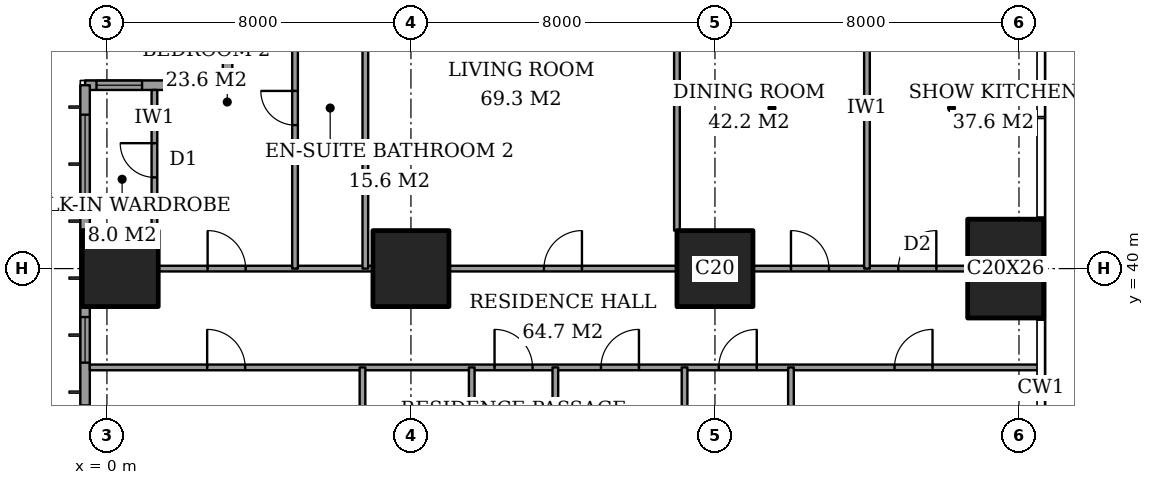
"""IFC4 building model, lengths in metres.
Left out: names, types, materials, properties, quantities, classifications, styles, units other than length and angle.
Written with IfcOpenShell. Run it as: python <this file> out.ifc"""

import sys

from ifc_helpers import new_model, si_unit, direction, frame, frame_2d, origin, origin_2d, place, context, subcontext, project, spatial, rectangle, extrude, element, fill, save


model = new_model("IFC4")
c1 = context("Model", 3, precision=1e-05, world=origin(), true_north=direction((0.0, 1.0)))
c2 = subcontext(c1, "Body", "Model", "MODEL_VIEW")
j1 = project(units=[si_unit("LENGTHUNIT", "METRE"), si_unit("PLANEANGLEUNIT", "RADIAN")], contexts=[c1])
p1 = place(None, origin())
s1 = spatial("IfcSite", under=j1, at=p1, CompositionType="ELEMENT")
p2 = place(p1, origin())
s2 = spatial("IfcBuilding", under=s1, at=p2, CompositionType="ELEMENT")
p3 = place(p2, frame((0.0, 0.0, 62.0)))
s3 = spatial("IfcBuildingStorey", under=s2, at=p3, CompositionType="ELEMENT", Elevation=62.0)
for number, where, z_axis, x_axis in (
    (1, (0.35, 40.0, 0.0), (0.0, 0.0, 1.0), (1.0, 0.0, 0.0)),
    (2, (8.0, 40.0, 0.0), (0.0, 0.0, 1.0), (1.0, 0.0, 0.0)),
    (3, (16.0, 40.0, 0.0), (0.0, 0.0, 1.0), (1.0, 0.0, 0.0)),
):
    element("IfcColumn", number, at=place(p3, frame(where, z_axis=z_axis, x_axis=x_axis)), inside=s3, PredefinedType="COLUMN", context=c2, shape_type="SweptSolid", body=[
        extrude(rectangle(XDim=2.0, YDim=2.0, at=origin_2d()), origin(), (0.0, 0.0, 1.0), 3.6),
    ])
p4 = place(p3, frame((23.65, 40.0, 0.0), z_axis=(0.0, 0.0, 1.0), x_axis=(1.0, 0.0, 0.0)))
e4 = element("IfcColumn", 4, at=p4, inside=s3, PredefinedType="COLUMN", context=c2, shape_type="SweptSolid", body=[
    extrude(rectangle(XDim=2.0, YDim=2.6, at=origin_2d()), origin(), (0.0, 0.0, 1.0), 3.6),
])
p5 = place(p3, frame((3.175, 48.575, 0.0), z_axis=(0.0, 0.0, 1.0), x_axis=(0.0, -1.0, 0.0)))
e5 = element("IfcWall", 5, at=p5, inside=s3, PredefinedType="SOLIDWALL", context=c2, shape_type="SweptSolid", body=[
    extrude(rectangle(XDim=3.75, YDim=0.25, at=frame_2d((1.875, 0.0))), origin(), (0.0, 0.0, 1.0), 3.6),
])
p6 = place(p5, frame((0.738, 0.0, 0.6)))
e6 = element("IfcOpeningElement", 6, at=p6, cuts=e5, PredefinedType="OPENING", context=c2, shape_type="SweptSolid", body=[
    extrude(rectangle(XDim=2.4, YDim=2.0, at=frame_2d((1.2, 1.0))), frame((0.0, 0.135, 0.0), z_axis=(0.0, -1.0, 0.0), x_axis=(1.0, 0.0, 0.0)), (0.0, 0.0, 1.0), 0.27),
])
p7 = place(p3, frame((3.175, 44.825, 0.0), z_axis=(0.0, 0.0, 1.0), x_axis=(-1.0, 0.0, 0.0)))
e7 = element("IfcWall", 7, at=p7, inside=s3, PredefinedType="SOLIDWALL", context=c2, shape_type="SweptSolid", body=[
    extrude(rectangle(XDim=3.75, YDim=0.25, at=frame_2d((1.875, 0.0))), origin(), (0.0, 0.0, 1.0), 3.6),
])
p8 = place(p7, frame((0.363, 0.0, 0.6)))
e8 = element("IfcOpeningElement", 8, at=p8, cuts=e7, PredefinedType="OPENING", context=c2, shape_type="SweptSolid", body=[
    extrude(rectangle(XDim=1.2, YDim=2.0, at=frame_2d((0.6, 1.0))), frame((0.0, 0.135, 0.0), z_axis=(0.0, -1.0, 0.0), x_axis=(1.0, 0.0, 0.0)), (0.0, 0.0, 1.0), 0.27),
])
p9 = place(p7, frame((2.25, 0.0, 0.6)))
e9 = element("IfcOpeningElement", 9, at=p9, cuts=e7, PredefinedType="OPENING", context=c2, shape_type="SweptSolid", body=[
    extrude(rectangle(XDim=1.2, YDim=2.0, at=frame_2d((0.6, 1.0))), frame((0.0, 0.135, 0.0), z_axis=(0.0, -1.0, 0.0), x_axis=(1.0, 0.0, 0.0)), (0.0, 0.0, 1.0), 0.27),
])
p10 = place(p3, frame((-0.575, 44.825, 0.0), z_axis=(0.0, 0.0, 1.0), x_axis=(0.0, -1.0, 0.0)))
e10 = element("IfcWall", 10, at=p10, inside=s3, PredefinedType="SOLIDWALL", context=c2, shape_type="SweptSolid", body=[
    extrude(rectangle(XDim=41.65, YDim=0.25, at=frame_2d((20.825, 0.0))), origin(), (0.0, 0.0, 1.0), 3.6),
])
p11 = place(p10, frame((0.775, 0.0, 0.6)))
e11 = element("IfcOpeningElement", 11, at=p11, cuts=e10, PredefinedType="OPENING", context=c2, shape_type="SweptSolid", body=[
    extrude(rectangle(XDim=2.4, YDim=2.0, at=frame_2d((1.2, 1.0))), frame((0.0, 0.135, 0.0), z_axis=(0.0, -1.0, 0.0), x_axis=(1.0, 0.0, 0.0)), (0.0, 0.0, 1.0), 0.27),
])
p12 = place(p10, frame((6.1, 0.0, 0.6)))
e12 = element("IfcOpeningElement", 12, at=p12, cuts=e10, PredefinedType="OPENING", context=c2, shape_type="SweptSolid", body=[
    extrude(rectangle(XDim=1.2, YDim=2.0, at=frame_2d((0.6, 1.0))), frame((0.0, 0.135, 0.0), z_axis=(0.0, -1.0, 0.0), x_axis=(1.0, 0.0, 0.0)), (0.0, 0.0, 1.0), 0.27),
])
p13 = place(p10, frame((8.425, 0.0, 0.6)))
e13 = element("IfcOpeningElement", 13, at=p13, cuts=e10, PredefinedType="OPENING", context=c2, shape_type="SweptSolid", body=[
    extrude(rectangle(XDim=2.4, YDim=2.0, at=frame_2d((1.2, 1.0))), frame((0.0, 0.135, 0.0), z_axis=(0.0, -1.0, 0.0), x_axis=(1.0, 0.0, 0.0)), (0.0, 0.0, 1.0), 0.27),
])
p14 = place(p10, frame((15.625, 0.0, 0.6)))
e14 = element("IfcOpeningElement", 14, at=p14, cuts=e10, PredefinedType="OPENING", context=c2, shape_type="SweptSolid", body=[
    extrude(rectangle(XDim=2.4, YDim=2.0, at=frame_2d((1.2, 1.0))), frame((0.0, 0.135, 0.0), z_axis=(0.0, -1.0, 0.0), x_axis=(1.0, 0.0, 0.0)), (0.0, 0.0, 1.0), 0.27),
])
p15 = place(p10, frame((23.625, 0.0, 0.6)))
e15 = element("IfcOpeningElement", 15, at=p15, cuts=e10, PredefinedType="OPENING", context=c2, shape_type="SweptSolid", body=[
    extrude(rectangle(XDim=2.4, YDim=2.0, at=frame_2d((1.2, 1.0))), frame((0.0, 0.135, 0.0), z_axis=(0.0, -1.0, 0.0), x_axis=(1.0, 0.0, 0.0)), (0.0, 0.0, 1.0), 0.27),
])
p16 = place(p10, frame((30.825, 0.0, 0.6)))
e16 = element("IfcOpeningElement", 16, at=p16, cuts=e10, PredefinedType="OPENING", context=c2, shape_type="SweptSolid", body=[
    extrude(rectangle(XDim=2.4, YDim=2.0, at=frame_2d((1.2, 1.0))), frame((0.0, 0.135, 0.0), z_axis=(0.0, -1.0, 0.0), x_axis=(1.0, 0.0, 0.0)), (0.0, 0.0, 1.0), 0.27),
])
p17 = place(p10, frame((34.5, 0.0, 0.6)))
e17 = element("IfcOpeningElement", 17, at=p17, cuts=e10, PredefinedType="OPENING", context=c2, shape_type="SweptSolid", body=[
    extrude(rectangle(XDim=1.2, YDim=2.0, at=frame_2d((0.6, 1.0))), frame((0.0, 0.135, 0.0), z_axis=(0.0, -1.0, 0.0), x_axis=(1.0, 0.0, 0.0)), (0.0, 0.0, 1.0), 0.27),
])
p18 = place(p10, frame((38.475, 0.0, 0.6)))
e18 = element("IfcOpeningElement", 18, at=p18, cuts=e10, PredefinedType="OPENING", context=c2, shape_type="SweptSolid", body=[
    extrude(rectangle(XDim=2.4, YDim=2.0, at=frame_2d((1.2, 1.0))), frame((0.0, 0.135, 0.0), z_axis=(0.0, -1.0, 0.0), x_axis=(1.0, 0.0, 0.0)), (0.0, 0.0, 1.0), 0.27),
])
p19 = place(p3, frame((-0.45, 37.4, 0.0), z_axis=(0.0, 0.0, 1.0), x_axis=(1.0, 0.0, 0.0)))
e19 = element("IfcWall", 19, at=p19, inside=s3, PredefinedType="PARTITIONING", context=c2, shape_type="SweptSolid", body=[
    extrude(rectangle(XDim=25.011, YDim=0.15, at=frame_2d((12.505, 0.0))), origin(), (0.0, 0.0, 1.0), 3.35),
])
p20 = place(p19, frame((10.65, 0.0, 0.0)))
e20 = element("IfcOpeningElement", 20, at=p20, cuts=e19, PredefinedType="OPENING", context=c2, shape_type="SweptSolid", body=[
    extrude(rectangle(XDim=1.0, YDim=2.1, at=frame_2d((0.5, 1.05))), frame((0.0, 0.085, 0.0), z_axis=(0.0, -1.0, 0.0), x_axis=(1.0, 0.0, 0.0)), (0.0, 0.0, 1.0), 0.17),
])
p21 = place(p19, frame((3.087, 0.0, 0.0)))
e21 = element("IfcOpeningElement", 21, at=p21, cuts=e19, PredefinedType="OPENING", context=c2, shape_type="SweptSolid", body=[
    extrude(rectangle(XDim=1.0, YDim=2.1, at=frame_2d((0.5, 1.05))), frame((0.0, 0.085, 0.0), z_axis=(0.0, -1.0, 0.0), x_axis=(1.0, 0.0, 0.0)), (0.0, 0.0, 1.0), 0.17),
])
p22 = place(p19, frame((13.45, 0.0, 0.0)))
e22 = element("IfcOpeningElement", 22, at=p22, cuts=e19, PredefinedType="OPENING", context=c2, shape_type="SweptSolid", body=[
    extrude(rectangle(XDim=1.0, YDim=2.1, at=frame_2d((0.5, 1.05))), frame((0.0, 0.085, 0.0), z_axis=(0.0, -1.0, 0.0), x_axis=(1.0, 0.0, 0.0)), (0.0, 0.0, 1.0), 0.17),
])
p23 = place(p19, frame((16.55, 0.0, 0.0)))
e23 = element("IfcOpeningElement", 23, at=p23, cuts=e19, PredefinedType="OPENING", context=c2, shape_type="SweptSolid", body=[
    extrude(rectangle(XDim=1.0, YDim=2.1, at=frame_2d((0.5, 1.05))), frame((0.0, 0.085, 0.0), z_axis=(0.0, -1.0, 0.0), x_axis=(1.0, 0.0, 0.0)), (0.0, 0.0, 1.0), 0.17),
])
p24 = place(p19, frame((21.175, 0.0, 0.0)))
e24 = element("IfcOpeningElement", 24, at=p24, cuts=e19, PredefinedType="OPENING", context=c2, shape_type="SweptSolid", body=[
    extrude(rectangle(XDim=1.0, YDim=2.1, at=frame_2d((0.5, 1.05))), frame((0.0, 0.085, 0.0), z_axis=(0.0, -1.0, 0.0), x_axis=(1.0, 0.0, 0.0)), (0.0, 0.0, 1.0), 0.17),
])
p25 = place(p3, frame((1.35, 40.0, 0.0), z_axis=(0.0, 0.0, 1.0), x_axis=(1.0, 0.0, 0.0)))
e25 = element("IfcWall", 25, at=p25, inside=s3, PredefinedType="PARTITIONING", context=c2, shape_type="SweptSolid", body=[
    extrude(rectangle(XDim=5.65, YDim=0.15, at=frame_2d((2.825, 0.0))), origin(), (0.0, 0.0, 1.0), 3.35),
])
p26 = place(p25, frame((1.3, 0.0, 0.0)))
e26 = element("IfcOpeningElement", 26, at=p26, cuts=e25, PredefinedType="OPENING", context=c2, shape_type="SweptSolid", body=[
    extrude(rectangle(XDim=1.0, YDim=2.1, at=frame_2d((0.5, 1.05))), frame((0.0, 0.085, 0.0), z_axis=(0.0, -1.0, 0.0), x_axis=(1.0, 0.0, 0.0)), (0.0, 0.0, 1.0), 0.17),
])
p27 = place(p3, frame((9.0, 40.0, 0.0), z_axis=(0.0, 0.0, 1.0), x_axis=(1.0, 0.0, 0.0)))
e27 = element("IfcWall", 27, at=p27, inside=s3, PredefinedType="PARTITIONING", context=c2, shape_type="SweptSolid", body=[
    extrude(rectangle(XDim=6.0, YDim=0.15, at=frame_2d((3.0, 0.0))), origin(), (0.0, 0.0, 1.0), 3.35),
])
p28 = place(p27, frame((2.5, 0.0, 0.0)))
e28 = element("IfcOpeningElement", 28, at=p28, cuts=e27, PredefinedType="OPENING", context=c2, shape_type="SweptSolid", body=[
    extrude(rectangle(XDim=1.0, YDim=2.1, at=frame_2d((0.5, 1.05))), frame((0.0, 0.085, 0.0), z_axis=(0.0, -1.0, 0.0), x_axis=(1.0, 0.0, 0.0)), (0.0, 0.0, 1.0), 0.17),
])
p29 = place(p3, frame((17.0, 40.0, 0.0), z_axis=(0.0, 0.0, 1.0), x_axis=(1.0, 0.0, 0.0)))
e29 = element("IfcWall", 29, at=p29, inside=s3, PredefinedType="PARTITIONING", context=c2, shape_type="SweptSolid", body=[
    extrude(rectangle(XDim=5.65, YDim=0.15, at=frame_2d((2.825, 0.0))), origin(), (0.0, 0.0, 1.0), 3.35),
])
p30 = place(p29, frame((1.0, 0.0, 0.0)))
e30 = element("IfcOpeningElement", 30, at=p30, cuts=e29, PredefinedType="OPENING", context=c2, shape_type="SweptSolid", body=[
    extrude(rectangle(XDim=1.0, YDim=2.1, at=frame_2d((0.5, 1.05))), frame((0.0, 0.085, 0.0), z_axis=(0.0, -1.0, 0.0), x_axis=(1.0, 0.0, 0.0)), (0.0, 0.0, 1.0), 0.17),
])
p31 = place(p29, frame((3.825, 0.0, 0.0)))
e31 = element("IfcOpeningElement", 31, at=p31, cuts=e29, PredefinedType="OPENING", context=c2, shape_type="SweptSolid", body=[
    extrude(rectangle(XDim=1.0, YDim=2.1, at=frame_2d((0.5, 1.05))), frame((0.0, 0.085, 0.0), z_axis=(0.0, -1.0, 0.0), x_axis=(1.0, 0.0, 0.0)), (0.0, 0.0, 1.0), 0.17),
])
p32 = place(p3, frame((1.25, 41.0, 0.0), z_axis=(0.0, 0.0, 1.0), x_axis=(0.0, 1.0, 0.0)))
e32 = element("IfcWall", 32, at=p32, inside=s3, PredefinedType="PARTITIONING", context=c2, shape_type="SweptSolid", body=[
    extrude(rectangle(XDim=3.7, YDim=0.15, at=frame_2d((1.85, 0.0))), origin(), (0.0, 0.0, 1.0), 3.35),
])
p33 = place(p32, frame((1.4, 0.0, 0.0)))
e33 = element("IfcOpeningElement", 33, at=p33, cuts=e32, PredefinedType="OPENING", context=c2, shape_type="SweptSolid", body=[
    extrude(rectangle(XDim=0.9, YDim=2.1, at=frame_2d((0.45, 1.05))), frame((0.0, 0.085, 0.0), z_axis=(0.0, -1.0, 0.0), x_axis=(1.0, 0.0, 0.0)), (0.0, 0.0, 1.0), 0.17),
])
p34 = place(p3, frame((4.95, 40.0, 0.0), z_axis=(0.0, 0.0, 1.0), x_axis=(0.0, 1.0, 0.0)))
e34 = element("IfcWall", 34, at=p34, inside=s3, PredefinedType="PARTITIONING", context=c2, shape_type="SweptSolid", body=[
    extrude(rectangle(XDim=8.45, YDim=0.15, at=frame_2d((4.225, 0.0))), origin(), (0.0, 0.0, 1.0), 3.35),
])
p35 = place(p34, frame((3.775, 0.0, 0.0)))
e35 = element("IfcOpeningElement", 35, at=p35, cuts=e34, PredefinedType="OPENING", context=c2, shape_type="SweptSolid", body=[
    extrude(rectangle(XDim=0.9, YDim=2.1, at=frame_2d((0.45, 1.05))), frame((0.0, 0.085, 0.0), z_axis=(0.0, -1.0, 0.0), x_axis=(1.0, 0.0, 0.0)), (0.0, 0.0, 1.0), 0.17),
])
p36 = place(p3, frame((6.725, 33.2, 0.0), z_axis=(0.0, 0.0, 1.0), x_axis=(0.0, 1.0, 0.0)))
e36 = element("IfcWall", 36, at=p36, inside=s3, PredefinedType="PARTITIONING", context=c2, shape_type="SweptSolid", body=[
    extrude(rectangle(XDim=4.2, YDim=0.15, at=frame_2d((2.1, 0.0))), origin(), (0.0, 0.0, 1.0), 3.35),
])
p37 = place(p36, frame((2.1, 0.0, 0.0)))
e37 = element("IfcOpeningElement", 37, at=p37, cuts=e36, PredefinedType="OPENING", context=c2, shape_type="SweptSolid", body=[
    extrude(rectangle(XDim=0.9, YDim=2.1, at=frame_2d((0.45, 1.05))), frame((0.0, 0.085, 0.0), z_axis=(0.0, -1.0, 0.0), x_axis=(1.0, 0.0, 0.0)), (0.0, 0.0, 1.0), 0.17),
])
p38 = place(p3, frame((6.8, 40.0, 0.0), z_axis=(0.0, 0.0, 1.0), x_axis=(0.0, 1.0, 0.0)))
e38 = element("IfcWall", 38, at=p38, inside=s3, PredefinedType="PARTITIONING", context=c2, shape_type="SweptSolid", body=[
    extrude(rectangle(XDim=8.45, YDim=0.15, at=frame_2d((4.225, 0.0))), origin(), (0.0, 0.0, 1.0), 3.35),
])
p39 = place(p3, frame((9.6, 28.0, 0.0), z_axis=(0.0, 0.0, 1.0), x_axis=(0.0, 1.0, 0.0)))
e39 = element("IfcWall", 39, at=p39, inside=s3, PredefinedType="PARTITIONING", context=c2, shape_type="SweptSolid", body=[
    extrude(rectangle(XDim=9.4, YDim=0.15, at=frame_2d((4.7, 0.0))), origin(), (0.0, 0.0, 1.0), 3.35),
])
p40 = place(p39, frame((0.5, 0.0, 0.0)))
e40 = element("IfcOpeningElement", 40, at=p40, cuts=e39, PredefinedType="OPENING", context=c2, shape_type="SweptSolid", body=[
    extrude(rectangle(XDim=1.0, YDim=2.1, at=frame_2d((0.5, 1.05))), frame((0.0, 0.085, 0.0), z_axis=(0.0, -1.0, 0.0), x_axis=(1.0, 0.0, 0.0)), (0.0, 0.0, 1.0), 0.17),
])
p41 = place(p3, frame((11.8, 30.0, 0.0), z_axis=(0.0, 0.0, 1.0), x_axis=(0.0, 1.0, 0.0)))
e41 = element("IfcWall", 41, at=p41, inside=s3, PredefinedType="PARTITIONING", context=c2, shape_type="SweptSolid", body=[
    extrude(rectangle(XDim=7.4, YDim=0.15, at=frame_2d((3.7, 0.0))), origin(), (0.0, 0.0, 1.0), 3.35),
])
p42 = place(p3, frame((15.0, 41.0, 0.0), z_axis=(0.0, 0.0, 1.0), x_axis=(0.0, 1.0, 0.0)))
e42 = element("IfcWall", 42, at=p42, inside=s3, PredefinedType="PARTITIONING", context=c2, shape_type="SweptSolid", body=[
    extrude(rectangle(XDim=5.65, YDim=0.15, at=frame_2d((2.825, 0.0))), origin(), (0.0, 0.0, 1.0), 3.35),
])
p43 = place(p3, frame((15.2, 33.2, 0.0), z_axis=(0.0, 0.0, 1.0), x_axis=(0.0, 1.0, 0.0)))
e43 = element("IfcWall", 43, at=p43, inside=s3, PredefinedType="PARTITIONING", context=c2, shape_type="SweptSolid", body=[
    extrude(rectangle(XDim=4.2, YDim=0.15, at=frame_2d((2.1, 0.0))), origin(), (0.0, 0.0, 1.0), 3.35),
])
p44 = place(p3, frame((18.0, 31.4, 0.0), z_axis=(0.0, 0.0, 1.0), x_axis=(0.0, 1.0, 0.0)))
e44 = element("IfcWall", 44, at=p44, inside=s3, PredefinedType="PARTITIONING", context=c2, shape_type="SweptSolid", body=[
    extrude(rectangle(XDim=6.0, YDim=0.15, at=frame_2d((3.0, 0.0))), origin(), (0.0, 0.0, 1.0), 3.35),
])
p45 = place(p3, frame((20.0, 40.0, 0.0), z_axis=(0.0, 0.0, 1.0), x_axis=(0.0, 1.0, 0.0)))
e45 = element("IfcWall", 45, at=p45, inside=s3, PredefinedType="PARTITIONING", context=c2, shape_type="SweptSolid", body=[
    extrude(rectangle(XDim=8.45, YDim=0.15, at=frame_2d((4.225, 0.0))), origin(), (0.0, 0.0, 1.0), 3.35),
])
p46 = place(p6, origin())
e46 = element("IfcWindow", 46, at=p46, inside=s3, PartitioningType="SINGLE_PANEL", PredefinedType="WINDOW", context=c2, shape_type="SweptSolid", body=[
    extrude(rectangle(XDim=2.4, YDim=2.0, at=frame_2d((1.2, 1.0))), frame((0.0, 0.03, 0.0), z_axis=(0.0, -1.0, 0.0), x_axis=(1.0, 0.0, 0.0)), (0.0, 0.0, 1.0), 0.06),
])
fill(e6, e46)
p47 = place(p8, origin())
e47 = element("IfcWindow", 47, at=p47, inside=s3, PartitioningType="SINGLE_PANEL", PredefinedType="WINDOW", context=c2, shape_type="SweptSolid", body=[
    extrude(rectangle(XDim=1.2, YDim=2.0, at=frame_2d((0.6, 1.0))), frame((0.0, 0.03, 0.0), z_axis=(0.0, -1.0, 0.0), x_axis=(1.0, 0.0, 0.0)), (0.0, 0.0, 1.0), 0.06),
])
fill(e8, e47)
p48 = place(p9, origin())
e48 = element("IfcWindow", 48, at=p48, inside=s3, PartitioningType="SINGLE_PANEL", PredefinedType="WINDOW", context=c2, shape_type="SweptSolid", body=[
    extrude(rectangle(XDim=1.2, YDim=2.0, at=frame_2d((0.6, 1.0))), frame((0.0, 0.03, 0.0), z_axis=(0.0, -1.0, 0.0), x_axis=(1.0, 0.0, 0.0)), (0.0, 0.0, 1.0), 0.06),
])
fill(e9, e48)
p49 = place(p11, origin())
e49 = element("IfcWindow", 49, at=p49, inside=s3, PartitioningType="SINGLE_PANEL", PredefinedType="WINDOW", context=c2, shape_type="SweptSolid", body=[
    extrude(rectangle(XDim=2.4, YDim=2.0, at=frame_2d((1.2, 1.0))), frame((0.0, 0.03, 0.0), z_axis=(0.0, -1.0, 0.0), x_axis=(1.0, 0.0, 0.0)), (0.0, 0.0, 1.0), 0.06),
])
fill(e11, e49)
p50 = place(p12, origin())
e50 = element("IfcWindow", 50, at=p50, inside=s3, PartitioningType="SINGLE_PANEL", PredefinedType="WINDOW", context=c2, shape_type="SweptSolid", body=[
    extrude(rectangle(XDim=1.2, YDim=2.0, at=frame_2d((0.6, 1.0))), frame((0.0, 0.03, 0.0), z_axis=(0.0, -1.0, 0.0), x_axis=(1.0, 0.0, 0.0)), (0.0, 0.0, 1.0), 0.06),
])
fill(e12, e50)
p51 = place(p33, origin())
e51 = element("IfcDoor", 51, at=p51, inside=s3, OperationType="SINGLE_SWING_LEFT", PredefinedType="DOOR", context=c2, shape_type="SweptSolid", body=[
    extrude(rectangle(XDim=0.9, YDim=2.1, at=frame_2d((0.45, 1.05))), frame((0.0, 0.025, 0.0), z_axis=(0.0, -1.0, 0.0), x_axis=(1.0, 0.0, 0.0)), (0.0, 0.0, 1.0), 0.05),
])
fill(e33, e51)
p52 = place(p26, origin())
e52 = element("IfcDoor", 52, at=p52, inside=s3, OperationType="SINGLE_SWING_RIGHT", PredefinedType="DOOR", context=c2, shape_type="SweptSolid", body=[
    extrude(rectangle(XDim=1.0, YDim=2.1, at=frame_2d((0.5, 1.05))), frame((0.0, 0.025, 0.0), z_axis=(0.0, -1.0, 0.0), x_axis=(1.0, 0.0, 0.0)), (0.0, 0.0, 1.0), 0.05),
])
fill(e26, e52)
p53 = place(p35, origin())
e53 = element("IfcDoor", 53, at=p53, inside=s3, OperationType="SINGLE_SWING_LEFT", PredefinedType="DOOR", context=c2, shape_type="SweptSolid", body=[
    extrude(rectangle(XDim=0.9, YDim=2.1, at=frame_2d((0.45, 1.05))), frame((0.0, 0.025, 0.0), z_axis=(0.0, -1.0, 0.0), x_axis=(1.0, 0.0, 0.0)), (0.0, 0.0, 1.0), 0.05),
])
fill(e35, e53)
p54 = place(p28, origin())
e54 = element("IfcDoor", 54, at=p54, inside=s3, OperationType="SINGLE_SWING_LEFT", PredefinedType="DOOR", context=c2, shape_type="SweptSolid", body=[
    extrude(rectangle(XDim=1.0, YDim=2.1, at=frame_2d((0.5, 1.05))), frame((0.0, 0.025, 0.0), z_axis=(0.0, -1.0, 0.0), x_axis=(1.0, 0.0, 0.0)), (0.0, 0.0, 1.0), 0.05),
])
fill(e28, e54)
p55 = place(p30, origin())
e55 = element("IfcDoor", 55, at=p55, inside=s3, OperationType="SINGLE_SWING_RIGHT", PredefinedType="DOOR", context=c2, shape_type="SweptSolid", body=[
    extrude(rectangle(XDim=1.0, YDim=2.1, at=frame_2d((0.5, 1.05))), frame((0.0, 0.025, 0.0), z_axis=(0.0, -1.0, 0.0), x_axis=(1.0, 0.0, 0.0)), (0.0, 0.0, 1.0), 0.05),
])
fill(e30, e55)
p56 = place(p31, origin())
e56 = element("IfcDoor", 56, at=p56, inside=s3, OperationType="SINGLE_SWING_LEFT", PredefinedType="DOOR", context=c2, shape_type="SweptSolid", body=[
    extrude(rectangle(XDim=1.0, YDim=2.1, at=frame_2d((0.5, 1.05))), frame((0.0, 0.025, 0.0), z_axis=(0.0, -1.0, 0.0), x_axis=(1.0, 0.0, 0.0)), (0.0, 0.0, 1.0), 0.05),
])
fill(e31, e56)
p57 = place(p20, origin())
e57 = element("IfcDoor", 57, at=p57, inside=s3, OperationType="SINGLE_SWING_RIGHT", PredefinedType="DOOR", context=c2, shape_type="SweptSolid", body=[
    extrude(rectangle(XDim=1.0, YDim=2.1, at=frame_2d((0.5, 1.05))), frame((0.0, 0.025, 0.0), z_axis=(0.0, -1.0, 0.0), x_axis=(1.0, 0.0, 0.0)), (0.0, 0.0, 1.0), 0.05),
])
fill(e20, e57)
p58 = place(p21, origin())
e58 = element("IfcDoor", 58, at=p58, inside=s3, OperationType="SINGLE_SWING_RIGHT", PredefinedType="DOOR", context=c2, shape_type="SweptSolid", body=[
    extrude(rectangle(XDim=1.0, YDim=2.1, at=frame_2d((0.5, 1.05))), frame((0.0, 0.025, 0.0), z_axis=(0.0, -1.0, 0.0), x_axis=(1.0, 0.0, 0.0)), (0.0, 0.0, 1.0), 0.05),
])
fill(e21, e58)
p59 = place(p22, origin())
e59 = element("IfcDoor", 59, at=p59, inside=s3, OperationType="SINGLE_SWING_LEFT", PredefinedType="DOOR", context=c2, shape_type="SweptSolid", body=[
    extrude(rectangle(XDim=1.0, YDim=2.1, at=frame_2d((0.5, 1.05))), frame((0.0, 0.025, 0.0), z_axis=(0.0, -1.0, 0.0), x_axis=(1.0, 0.0, 0.0)), (0.0, 0.0, 1.0), 0.05),
])
fill(e22, e59)
p60 = place(p23, origin())
e60 = element("IfcDoor", 60, at=p60, inside=s3, OperationType="SINGLE_SWING_LEFT", PredefinedType="DOOR", context=c2, shape_type="SweptSolid", body=[
    extrude(rectangle(XDim=1.0, YDim=2.1, at=frame_2d((0.5, 1.05))), frame((0.0, 0.025, 0.0), z_axis=(0.0, -1.0, 0.0), x_axis=(1.0, 0.0, 0.0)), (0.0, 0.0, 1.0), 0.05),
])
fill(e23, e60)
p61 = place(p24, origin())
e61 = element("IfcDoor", 61, at=p61, inside=s3, OperationType="SINGLE_SWING_LEFT", PredefinedType="DOOR", context=c2, shape_type="SweptSolid", body=[
    extrude(rectangle(XDim=1.0, YDim=2.1, at=frame_2d((0.5, 1.05))), frame((0.0, 0.025, 0.0), z_axis=(0.0, -1.0, 0.0), x_axis=(1.0, 0.0, 0.0)), (0.0, 0.0, 1.0), 0.05),
])
fill(e24, e61)
save(model, sys.argv[1])
